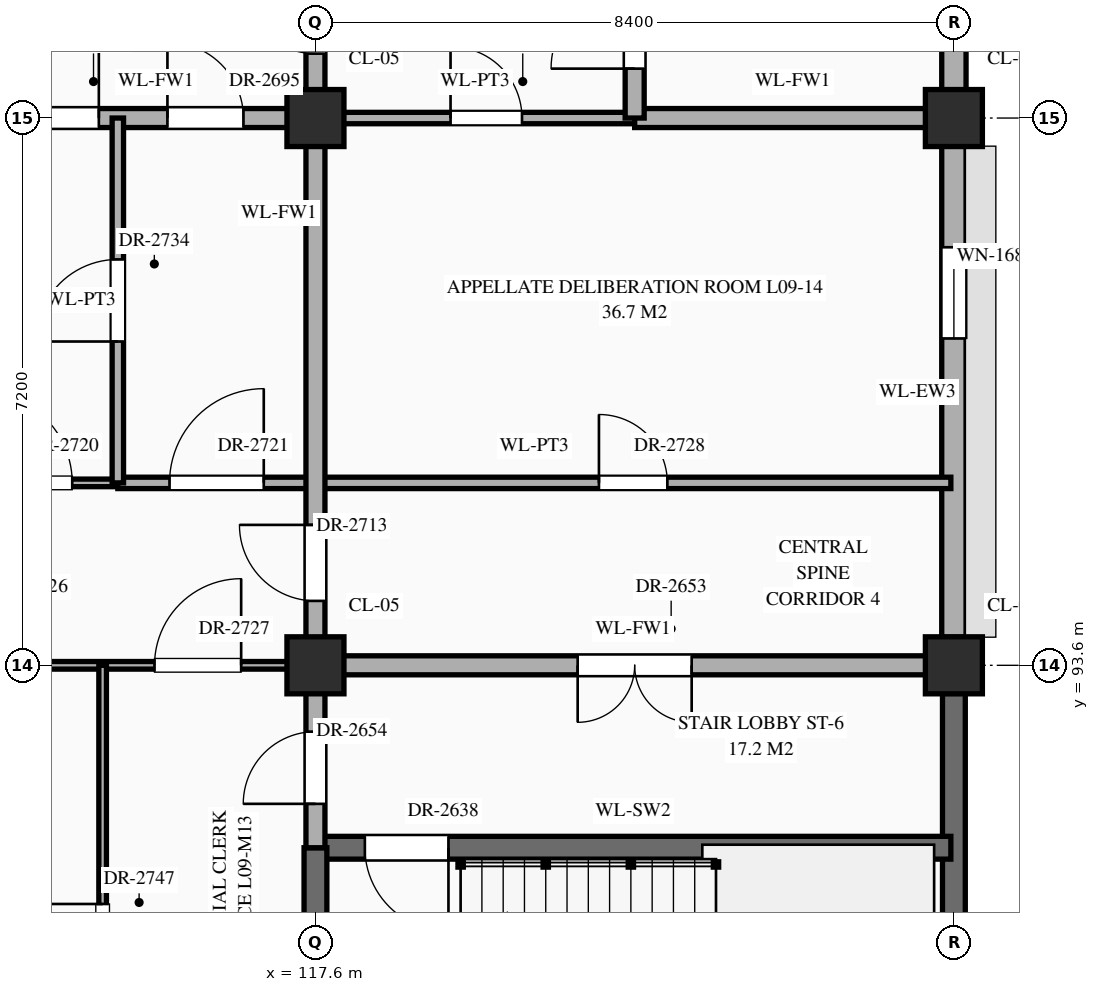
"""IFC4 building model, lengths in metres.
Left out: names, types, materials, properties, quantities, classifications, styles, units other than length and angle.
Written with IfcOpenShell. Run it as: python <this file> out.ifc"""

import sys

from ifc_helpers import new_model, si_unit, direction, frame, frame_2d, origin, origin_2d, place, context, subcontext, project, spatial, rectangle, extrude, element, fill, save


model = new_model("IFC4")
c1 = context("Model", 3, precision=1e-05, world=origin(), true_north=direction((0.0, 1.0)))
c2 = subcontext(c1, "Body", "Model", "MODEL_VIEW")
j1 = project(units=[si_unit("LENGTHUNIT", "METRE"), si_unit("PLANEANGLEUNIT", "RADIAN")], contexts=[c1])
p1 = place(None, origin())
s1 = spatial("IfcSite", under=j1, at=p1, CompositionType="ELEMENT")
p2 = place(p1, origin())
s2 = spatial("IfcBuilding", under=s1, at=p2, CompositionType="ELEMENT")
p3 = place(p2, frame((0.0, 0.0, 39.3)))
s3 = spatial("IfcBuildingStorey", under=s2, at=p3, CompositionType="ELEMENT", Elevation=39.3)
for number, where, z_axis, x_axis in (
    (1, (117.6, 93.6, 0.0), (0.0, 0.0, 1.0), (1.0, 0.0, 0.0)),
    (2, (117.6, 100.8, 0.0), (0.0, 0.0, 1.0), (1.0, 0.0, 0.0)),
    (3, (126.0, 93.6, 0.0), (0.0, 0.0, 1.0), (1.0, 0.0, 0.0)),
    (4, (126.0, 100.8, 0.0), (0.0, 0.0, 1.0), (1.0, 0.0, 0.0)),
):
    element("IfcColumn", number, at=place(p3, frame(where, z_axis=z_axis, x_axis=x_axis)), inside=s3, PredefinedType="COLUMN", context=c2, shape_type="SweptSolid", body=[
        extrude(rectangle(XDim=0.75, YDim=0.75, at=origin_2d()), origin(), (0.0, 0.0, 1.0), 4.2),
    ])
p4 = place(p3, frame((126.0, 86.77, 0.0), z_axis=(0.0, 0.0, 1.0), x_axis=(0.0, 1.0, 0.0)))
e5 = element("IfcWall", 5, at=p4, inside=s3, PredefinedType="SHEAR", context=c2, shape_type="SweptSolid", body=[
    extrude(rectangle(XDim=6.46, YDim=0.3, at=frame_2d((3.23, 0.0))), origin(), (0.0, 0.0, 1.0), 3.95),
])
p5 = place(p3, frame((126.0, 93.97, 0.0), z_axis=(0.0, 0.0, 1.0), x_axis=(0.0, 1.0, 0.0)))
e6 = element("IfcWall", 6, at=p5, inside=s3, PredefinedType="STANDARD", context=c2, shape_type="SweptSolid", body=[
    extrude(rectangle(XDim=6.46, YDim=0.32, at=frame_2d((3.23, 0.0))), origin(), (0.0, 0.0, 1.0), 3.3),
])
p6 = place(p5, frame((3.93, 0.0, 0.85)))
e7 = element("IfcOpeningElement", 7, at=p6, cuts=e6, PredefinedType="OPENING", context=c2, shape_type="SweptSolid", body=[
    extrude(rectangle(XDim=1.2, YDim=1.38, at=frame_2d((0.6, 0.69))), frame((0.0, 0.172, 0.0), z_axis=(0.0, -1.0, 0.0), x_axis=(1.0, 0.0, 0.0)), (0.0, 0.0, 1.0), 0.344),
])
p7 = place(p3, frame((126.0, 101.17, 0.0), z_axis=(0.0, 0.0, 1.0), x_axis=(0.0, 1.0, 0.0)))
e8 = element("IfcWall", 8, at=p7, inside=s3, PredefinedType="STANDARD", context=c2, shape_type="SweptSolid", body=[
    extrude(rectangle(XDim=6.46, YDim=0.32, at=frame_2d((3.23, 0.0))), origin(), (0.0, 0.0, 1.0), 3.3),
])
p8 = place(p3, frame((117.6, 91.2, 0.0), z_axis=(0.0, 0.0, 1.0), x_axis=(1.0, 0.0, 0.0)))
e9 = element("IfcWall", 9, at=p8, inside=s3, PredefinedType="SHEAR", context=c2, shape_type="SweptSolid", body=[
    extrude(rectangle(XDim=8.36, YDim=0.3, at=frame_2d((4.18, 0.0))), origin(), (0.0, 0.0, 1.0), 3.95),
])
p9 = place(p8, frame((0.65, 0.0, 0.0)))
e10 = element("IfcOpeningElement", 10, at=p9, cuts=e9, PredefinedType="OPENING", context=c2, shape_type="SweptSolid", body=[
    extrude(rectangle(XDim=1.1, YDim=2.2, at=frame_2d((0.55, 1.1))), frame((0.0, 0.162, 0.0), z_axis=(0.0, -1.0, 0.0), x_axis=(1.0, 0.0, 0.0)), (0.0, 0.0, 1.0), 0.324),
])
p10 = place(p3, frame((109.2, 93.6, 0.0), z_axis=(0.0, 0.0, 1.0), x_axis=(1.0, 0.0, 0.0)))
e11 = element("IfcWall", 11, at=p10, inside=s3, PredefinedType="STANDARD", context=c2, shape_type="SweptSolid", body=[
    extrude(rectangle(XDim=8.4, YDim=0.1, at=frame_2d((4.2, 0.0))), origin(), (0.0, 0.0, 1.0), 3.1),
])
p11 = place(p10, frame((1.038, 0.0, 0.0)))
e12 = element("IfcOpeningElement", 12, at=p11, cuts=e11, PredefinedType="OPENING", context=c2, shape_type="SweptSolid", body=[
    extrude(rectangle(XDim=1.02, YDim=2.4, at=frame_2d((0.51, 1.2))), frame((0.0, 0.062, 0.0), z_axis=(0.0, -1.0, 0.0), x_axis=(1.0, 0.0, 0.0)), (0.0, 0.0, 1.0), 0.124),
])
p12 = place(p10, frame((3.67, 0.0, 0.0)))
e13 = element("IfcOpeningElement", 13, at=p12, cuts=e11, PredefinedType="OPENING", context=c2, shape_type="SweptSolid", body=[
    extrude(rectangle(XDim=1.06, YDim=2.4, at=frame_2d((0.53, 1.2))), frame((0.0, 0.062, 0.0), z_axis=(0.0, -1.0, 0.0), x_axis=(1.0, 0.0, 0.0)), (0.0, 0.0, 1.0), 0.124),
])
p13 = place(p10, frame((6.282, 0.0, 0.0)))
e14 = element("IfcOpeningElement", 14, at=p13, cuts=e11, PredefinedType="OPENING", context=c2, shape_type="SweptSolid", body=[
    extrude(rectangle(XDim=1.14, YDim=2.4, at=frame_2d((0.57, 1.2))), frame((0.0, 0.062, 0.0), z_axis=(0.0, -1.0, 0.0), x_axis=(1.0, 0.0, 0.0)), (0.0, 0.0, 1.0), 0.124),
])
p14 = place(p3, frame((117.6, 93.6, 0.0), z_axis=(0.0, 0.0, 1.0), x_axis=(1.0, 0.0, 0.0)))
e15 = element("IfcWall", 15, at=p14, inside=s3, PredefinedType="STANDARD", context=c2, shape_type="SweptSolid", body=[
    extrude(rectangle(XDim=8.36, YDim=0.25, at=frame_2d((4.18, 0.0))), origin(), (0.0, 0.0, 1.0), 3.1),
])
p15 = place(p14, frame((3.45, 0.0, 0.0)))
e16 = element("IfcOpeningElement", 16, at=p15, cuts=e15, PredefinedType="OPENING", context=c2, shape_type="SweptSolid", body=[
    extrude(rectangle(XDim=1.5, YDim=2.25, at=frame_2d((0.75, 1.125))), frame((0.0, 0.137, 0.0), z_axis=(0.0, -1.0, 0.0), x_axis=(1.0, 0.0, 0.0)), (0.0, 0.0, 1.0), 0.274),
])
p16 = place(p3, frame((109.2, 96.0, 0.0), z_axis=(0.0, 0.0, 1.0), x_axis=(1.0, 0.0, 0.0)))
e17 = element("IfcWall", 17, at=p16, inside=s3, PredefinedType="STANDARD", context=c2, shape_type="SweptSolid", body=[
    extrude(rectangle(XDim=5.8, YDim=0.1, at=frame_2d((2.9, 0.0))), origin(), (0.0, 0.0, 1.0), 3.95),
])
p17 = place(p16, frame((1.12, 0.0, 0.0)))
e18 = element("IfcOpeningElement", 18, at=p17, cuts=e17, PredefinedType="OPENING", context=c2, shape_type="SweptSolid", body=[
    extrude(rectangle(XDim=1.16, YDim=2.3, at=frame_2d((0.58, 1.15))), frame((0.0, 0.062, 0.0), z_axis=(0.0, -1.0, 0.0), x_axis=(1.0, 0.0, 0.0)), (0.0, 0.0, 1.0), 0.124),
])
p18 = place(p16, frame((4.0, 0.0, 0.0)))
e19 = element("IfcOpeningElement", 19, at=p18, cuts=e17, PredefinedType="OPENING", context=c2, shape_type="SweptSolid", body=[
    extrude(rectangle(XDim=1.2, YDim=2.35, at=frame_2d((0.6, 1.175))), frame((0.0, 0.062, 0.0), z_axis=(0.0, -1.0, 0.0), x_axis=(1.0, 0.0, 0.0)), (0.0, 0.0, 1.0), 0.124),
])
p19 = place(p3, frame((115.0, 96.0, 0.0), z_axis=(0.0, 0.0, 1.0), x_axis=(1.0, 0.0, 0.0)))
e20 = element("IfcWall", 20, at=p19, inside=s3, PredefinedType="STANDARD", context=c2, shape_type="SweptSolid", body=[
    extrude(rectangle(XDim=10.96, YDim=0.15, at=frame_2d((5.48, 0.0))), origin(), (0.0, 0.0, 1.0), 3.95),
])
p20 = place(p19, frame((0.68, 0.0, 0.0)))
e21 = element("IfcOpeningElement", 21, at=p20, cuts=e20, PredefinedType="OPENING", context=c2, shape_type="SweptSolid", body=[
    extrude(rectangle(XDim=1.24, YDim=2.3, at=frame_2d((0.62, 1.15))), frame((0.0, 0.087, 0.0), z_axis=(0.0, -1.0, 0.0), x_axis=(1.0, 0.0, 0.0)), (0.0, 0.0, 1.0), 0.174),
])
p21 = place(p19, frame((6.33, 0.0, 0.0)))
e22 = element("IfcOpeningElement", 22, at=p21, cuts=e20, PredefinedType="OPENING", context=c2, shape_type="SweptSolid", body=[
    extrude(rectangle(XDim=0.9, YDim=2.15, at=frame_2d((0.45, 1.075))), frame((0.0, 0.087, 0.0), z_axis=(0.0, -1.0, 0.0), x_axis=(1.0, 0.0, 0.0)), (0.0, 0.0, 1.0), 0.174),
])
p22 = place(p3, frame((113.4, 100.8, 0.0), z_axis=(0.0, 0.0, 1.0), x_axis=(1.0, 0.0, 0.0)))
e23 = element("IfcWall", 23, at=p22, inside=s3, PredefinedType="STANDARD", context=c2, shape_type="SweptSolid", body=[
    extrude(rectangle(XDim=4.2, YDim=0.25, at=frame_2d((2.1, 0.0))), origin(), (0.0, 0.0, 1.0), 3.1),
])
p23 = place(p22, frame((0.25, 0.0, 0.0)))
e24 = element("IfcOpeningElement", 24, at=p23, cuts=e23, PredefinedType="OPENING", context=c2, shape_type="SweptSolid", body=[
    extrude(rectangle(XDim=1.1, YDim=2.2, at=frame_2d((0.55, 1.1))), frame((0.0, 0.137, 0.0), z_axis=(0.0, -1.0, 0.0), x_axis=(1.0, 0.0, 0.0)), (0.0, 0.0, 1.0), 0.274),
])
p24 = place(p22, frame((2.252, 0.0, 0.0)))
e25 = element("IfcOpeningElement", 25, at=p24, cuts=e23, PredefinedType="OPENING", context=c2, shape_type="SweptSolid", body=[
    extrude(rectangle(XDim=1.0, YDim=2.2, at=frame_2d((0.5, 1.1))), frame((0.0, 0.137, 0.0), z_axis=(0.0, -1.0, 0.0), x_axis=(1.0, 0.0, 0.0)), (0.0, 0.0, 1.0), 0.274),
])
p25 = place(p3, frame((117.6, 100.8, 0.0), z_axis=(0.0, 0.0, 1.0), x_axis=(1.0, 0.0, 0.0)))
e26 = element("IfcWall", 26, at=p25, inside=s3, PredefinedType="STANDARD", context=c2, shape_type="SweptSolid", body=[
    extrude(rectangle(XDim=4.2, YDim=0.15, at=frame_2d((2.1, 0.0))), origin(), (0.0, 0.0, 1.0), 3.1),
])
p26 = place(p25, frame((1.778, 0.0, 0.0)))
e27 = element("IfcOpeningElement", 27, at=p26, cuts=e26, PredefinedType="OPENING", context=c2, shape_type="SweptSolid", body=[
    extrude(rectangle(XDim=0.94, YDim=2.3, at=frame_2d((0.47, 1.15))), frame((0.0, 0.087, 0.0), z_axis=(0.0, -1.0, 0.0), x_axis=(1.0, 0.0, 0.0)), (0.0, 0.0, 1.0), 0.174),
])
p27 = place(p3, frame((121.8, 100.8, 0.0), z_axis=(0.0, 0.0, 1.0), x_axis=(1.0, 0.0, 0.0)))
e28 = element("IfcWall", 28, at=p27, inside=s3, PredefinedType="STANDARD", context=c2, shape_type="SweptSolid", body=[
    extrude(rectangle(XDim=4.16, YDim=0.25, at=frame_2d((2.08, 0.0))), origin(), (0.0, 0.0, 1.0), 3.1),
])
p28 = place(p3, frame((114.8, 86.4, 0.0), z_axis=(0.0, 0.0, 1.0), x_axis=(0.0, 1.0, 0.0)))
e29 = element("IfcWall", 29, at=p28, inside=s3, PredefinedType="STANDARD", context=c2, shape_type="SweptSolid", body=[
    extrude(rectangle(XDim=7.2, YDim=0.1, at=frame_2d((3.6, 0.0))), origin(), (0.0, 0.0, 1.0), 3.95),
])
p29 = place(p28, frame((3.14, 0.0, 0.0)))
e30 = element("IfcOpeningElement", 30, at=p29, cuts=e29, PredefinedType="OPENING", context=c2, shape_type="SweptSolid", body=[
    extrude(rectangle(XDim=0.92, YDim=2.15, at=frame_2d((0.46, 1.075))), frame((0.0, 0.062, 0.0), z_axis=(0.0, -1.0, 0.0), x_axis=(1.0, 0.0, 0.0)), (0.0, 0.0, 1.0), 0.124),
])
p30 = place(p3, frame((115.0, 96.0, 0.0), z_axis=(0.0, 0.0, 1.0), x_axis=(0.0, 1.0, 0.0)))
e31 = element("IfcWall", 31, at=p30, inside=s3, PredefinedType="STANDARD", context=c2, shape_type="SweptSolid", body=[
    extrude(rectangle(XDim=4.8, YDim=0.15, at=frame_2d((2.4, 0.0))), origin(), (0.0, 0.0, 1.0), 3.95),
])
p31 = place(p30, frame((1.86, 0.0, 0.0)))
e32 = element("IfcOpeningElement", 32, at=p31, cuts=e31, PredefinedType="OPENING", context=c2, shape_type="SweptSolid", body=[
    extrude(rectangle(XDim=1.08, YDim=2.25, at=frame_2d((0.54, 1.125))), frame((0.0, 0.087, 0.0), z_axis=(0.0, -1.0, 0.0), x_axis=(1.0, 0.0, 0.0)), (0.0, 0.0, 1.0), 0.174),
])
p32 = place(p3, frame((117.6, 86.4, 0.0), z_axis=(0.0, 0.0, 1.0), x_axis=(0.0, 1.0, 0.0)))
e33 = element("IfcWall", 33, at=p32, inside=s3, PredefinedType="SHEAR", context=c2, shape_type="SweptSolid", body=[
    extrude(rectangle(XDim=4.8, YDim=0.3, at=frame_2d((2.4, 0.0))), origin(), (0.0, 0.0, 1.0), 3.95),
])
p33 = place(p3, frame((117.6, 91.2, 0.0), z_axis=(0.0, 0.0, 1.0), x_axis=(0.0, 1.0, 0.0)))
e34 = element("IfcWall", 34, at=p33, inside=s3, PredefinedType="STANDARD", context=c2, shape_type="SweptSolid", body=[
    extrude(rectangle(XDim=13.2, YDim=0.25, at=frame_2d((6.6, 0.0))), origin(), (0.0, 0.0, 1.0), 3.2),
])
p34 = place(p33, frame((0.577, 0.0, 0.0)))
e35 = element("IfcOpeningElement", 35, at=p34, cuts=e34, PredefinedType="OPENING", context=c2, shape_type="SweptSolid", body=[
    extrude(rectangle(XDim=0.95, YDim=2.15, at=frame_2d((0.475, 1.075))), frame((0.0, 0.137, 0.0), z_axis=(0.0, -1.0, 0.0), x_axis=(1.0, 0.0, 0.0)), (0.0, 0.0, 1.0), 0.274),
])
p35 = place(p33, frame((10.448, 0.0, 0.0)))
e36 = element("IfcOpeningElement", 36, at=p35, cuts=e34, PredefinedType="OPENING", context=c2, shape_type="SweptSolid", body=[
    extrude(rectangle(XDim=1.0, YDim=2.2, at=frame_2d((0.5, 1.1))), frame((0.0, 0.137, 0.0), z_axis=(0.0, -1.0, 0.0), x_axis=(1.0, 0.0, 0.0)), (0.0, 0.0, 1.0), 0.274),
])
p36 = place(p33, frame((3.248, 0.0, 0.0)))
e37 = element("IfcOpeningElement", 37, at=p36, cuts=e34, PredefinedType="OPENING", context=c2, shape_type="SweptSolid", body=[
    extrude(rectangle(XDim=1.0, YDim=2.2, at=frame_2d((0.5, 1.1))), frame((0.0, 0.137, 0.0), z_axis=(0.0, -1.0, 0.0), x_axis=(1.0, 0.0, 0.0)), (0.0, 0.0, 1.0), 0.274),
])
p37 = place(p3, frame((121.8, 100.8, 0.0), z_axis=(0.0, 0.0, 1.0), x_axis=(0.0, 1.0, 0.0)))
e38 = element("IfcWall", 38, at=p37, inside=s3, PredefinedType="STANDARD", context=c2, shape_type="SweptSolid", body=[
    extrude(rectangle(XDim=3.6, YDim=0.25, at=frame_2d((1.8, 0.0))), origin(), (0.0, 0.0, 1.0), 3.6),
])
p38 = place(p37, frame((0.65, 0.0, 0.0)))
e39 = element("IfcOpeningElement", 39, at=p38, cuts=e38, PredefinedType="OPENING", context=c2, shape_type="SweptSolid", body=[
    extrude(rectangle(XDim=1.1, YDim=2.2, at=frame_2d((0.55, 1.1))), frame((0.0, 0.137, 0.0), z_axis=(0.0, -1.0, 0.0), x_axis=(1.0, 0.0, 0.0)), (0.0, 0.0, 1.0), 0.274),
])
p39 = place(p6, origin())
e40 = element("IfcWindow", 40, at=p39, inside=s3, PartitioningType="SINGLE_PANEL", PredefinedType="WINDOW", context=c2, shape_type="SweptSolid", body=[
    extrude(rectangle(XDim=1.2, YDim=1.38, at=frame_2d((0.6, 0.69))), frame((0.0, 0.03, 0.0), z_axis=(0.0, -1.0, 0.0), x_axis=(1.0, 0.0, 0.0)), (0.0, 0.0, 1.0), 0.06),
])
fill(e7, e40)
p40 = place(p9, frame((1.1, 0.0, 0.0), z_axis=(0.0, 0.0, 1.0), x_axis=(-1.0, 0.0, 0.0)))
e41 = element("IfcDoor", 41, at=p40, inside=s3, OperationType="SINGLE_SWING_LEFT", PredefinedType="DOOR", context=c2, shape_type="SweptSolid", body=[
    extrude(rectangle(XDim=1.1, YDim=2.2, at=frame_2d((0.55, 1.1))), frame((0.0, 0.025, 0.0), z_axis=(0.0, -1.0, 0.0), x_axis=(1.0, 0.0, 0.0)), (0.0, 0.0, 1.0), 0.05),
])
fill(e10, e41)
p41 = place(p15, frame((1.5, 0.0, 0.0), z_axis=(0.0, 0.0, 1.0), x_axis=(-1.0, 0.0, 0.0)))
e42 = element("IfcDoor", 42, at=p41, inside=s3, OperationType="DOUBLE_DOOR_SINGLE_SWING", PredefinedType="DOOR", context=c2, shape_type="SweptSolid", body=[
    extrude(rectangle(XDim=1.5, YDim=2.25, at=frame_2d((0.75, 1.125))), frame((0.0, 0.025, 0.0), z_axis=(0.0, -1.0, 0.0), x_axis=(1.0, 0.0, 0.0)), (0.0, 0.0, 1.0), 0.05),
])
fill(e16, e42)
p42 = place(p34, origin())
e43 = element("IfcDoor", 43, at=p42, inside=s3, OperationType="SINGLE_SWING_LEFT", PredefinedType="DOOR", context=c2, shape_type="SweptSolid", body=[
    extrude(rectangle(XDim=0.95, YDim=2.15, at=frame_2d((0.475, 1.075))), frame((0.0, 0.025, 0.0), z_axis=(0.0, -1.0, 0.0), x_axis=(1.0, 0.0, 0.0)), (0.0, 0.0, 1.0), 0.05),
])
fill(e35, e43)
p43 = place(p38, origin())
e44 = element("IfcDoor", 44, at=p43, inside=s3, OperationType="SINGLE_SWING_LEFT", PredefinedType="DOOR", context=c2, shape_type="SweptSolid", body=[
    extrude(rectangle(XDim=1.1, YDim=2.2, at=frame_2d((0.55, 1.1))), frame((0.0, 0.025, 0.0), z_axis=(0.0, -1.0, 0.0), x_axis=(1.0, 0.0, 0.0)), (0.0, 0.0, 1.0), 0.05),
])
fill(e39, e44)
p44 = place(p35, origin())
e45 = element("IfcDoor", 45, at=p44, inside=s3, OperationType="SINGLE_SWING_RIGHT", PredefinedType="DOOR", context=c2, shape_type="SweptSolid", body=[
    extrude(rectangle(XDim=1.0, YDim=2.2, at=frame_2d((0.5, 1.1))), frame((0.0, 0.025, 0.0), z_axis=(0.0, -1.0, 0.0), x_axis=(1.0, 0.0, 0.0)), (0.0, 0.0, 1.0), 0.05),
])
fill(e36, e45)
p45 = place(p26, origin())
e46 = element("IfcDoor", 46, at=p45, inside=s3, OperationType="SINGLE_SWING_LEFT", PredefinedType="DOOR", context=c2, shape_type="SweptSolid", body=[
    extrude(rectangle(XDim=0.94, YDim=2.3, at=frame_2d((0.47, 1.15))), frame((0.0, 0.025, 0.0), z_axis=(0.0, -1.0, 0.0), x_axis=(1.0, 0.0, 0.0)), (0.0, 0.0, 1.0), 0.05),
])
fill(e27, e46)
p46 = place(p23, origin())
e47 = element("IfcDoor", 47, at=p46, inside=s3, OperationType="SINGLE_SWING_RIGHT", PredefinedType="DOOR", context=c2, shape_type="SweptSolid", body=[
    extrude(rectangle(XDim=1.1, YDim=2.2, at=frame_2d((0.55, 1.1))), frame((0.0, 0.025, 0.0), z_axis=(0.0, -1.0, 0.0), x_axis=(1.0, 0.0, 0.0)), (0.0, 0.0, 1.0), 0.05),
])
fill(e24, e47)
p47 = place(p24, origin())
e48 = element("IfcDoor", 48, at=p47, inside=s3, OperationType="SINGLE_SWING_LEFT", PredefinedType="DOOR", context=c2, shape_type="SweptSolid", body=[
    extrude(rectangle(XDim=1.0, YDim=2.2, at=frame_2d((0.5, 1.1))), frame((0.0, 0.025, 0.0), z_axis=(0.0, -1.0, 0.0), x_axis=(1.0, 0.0, 0.0)), (0.0, 0.0, 1.0), 0.05),
])
fill(e25, e48)
p48 = place(p36, origin())
e49 = element("IfcDoor", 49, at=p48, inside=s3, OperationType="SINGLE_SWING_RIGHT", PredefinedType="DOOR", context=c2, shape_type="SweptSolid", body=[
    extrude(rectangle(XDim=1.0, YDim=2.2, at=frame_2d((0.5, 1.1))), frame((0.0, 0.025, 0.0), z_axis=(0.0, -1.0, 0.0), x_axis=(1.0, 0.0, 0.0)), (0.0, 0.0, 1.0), 0.05),
])
fill(e37, e49)
p49 = place(p18, origin())
e50 = element("IfcDoor", 50, at=p49, inside=s3, OperationType="SINGLE_SWING_LEFT", PredefinedType="DOOR", context=c2, shape_type="SweptSolid", body=[
    extrude(rectangle(XDim=1.2, YDim=2.35, at=frame_2d((0.6, 1.175))), frame((0.0, 0.025, 0.0), z_axis=(0.0, -1.0, 0.0), x_axis=(1.0, 0.0, 0.0)), (0.0, 0.0, 1.0), 0.05),
])
fill(e19, e50)
p50 = place(p20, origin())
e51 = element("IfcDoor", 51, at=p50, inside=s3, OperationType="SINGLE_SWING_RIGHT", PredefinedType="DOOR", context=c2, shape_type="SweptSolid", body=[
    extrude(rectangle(XDim=1.24, YDim=2.3, at=frame_2d((0.62, 1.15))), frame((0.0, 0.025, 0.0), z_axis=(0.0, -1.0, 0.0), x_axis=(1.0, 0.0, 0.0)), (0.0, 0.0, 1.0), 0.05),
])
fill(e21, e51)
p51 = place(p13, origin())
e52 = element("IfcDoor", 52, at=p51, inside=s3, OperationType="SINGLE_SWING_RIGHT", PredefinedType="DOOR", context=c2, shape_type="SweptSolid", body=[
    extrude(rectangle(XDim=1.14, YDim=2.4, at=frame_2d((0.57, 1.2))), frame((0.0, 0.025, 0.0), z_axis=(0.0, -1.0, 0.0), x_axis=(1.0, 0.0, 0.0)), (0.0, 0.0, 1.0), 0.05),
])
fill(e14, e52)
p52 = place(p21, origin())
e53 = element("IfcDoor", 53, at=p52, inside=s3, OperationType="SINGLE_SWING_LEFT", PredefinedType="DOOR", context=c2, shape_type="SweptSolid", body=[
    extrude(rectangle(XDim=0.9, YDim=2.15, at=frame_2d((0.45, 1.075))), frame((0.0, 0.025, 0.0), z_axis=(0.0, -1.0, 0.0), x_axis=(1.0, 0.0, 0.0)), (0.0, 0.0, 1.0), 0.05),
])
fill(e22, e53)
p53 = place(p31, origin())
e54 = element("IfcDoor", 54, at=p53, inside=s3, OperationType="SINGLE_SWING_LEFT", PredefinedType="DOOR", context=c2, shape_type="SweptSolid", body=[
    extrude(rectangle(XDim=1.08, YDim=2.25, at=frame_2d((0.54, 1.125))), frame((0.0, 0.025, 0.0), z_axis=(0.0, -1.0, 0.0), x_axis=(1.0, 0.0, 0.0)), (0.0, 0.0, 1.0), 0.05),
])
fill(e32, e54)
p54 = place(p29, origin())
e55 = element("IfcDoor", 55, at=p54, inside=s3, OperationType="SINGLE_SWING_RIGHT", PredefinedType="DOOR", context=c2, shape_type="SweptSolid", body=[
    extrude(rectangle(XDim=0.92, YDim=2.15, at=frame_2d((0.46, 1.075))), frame((0.0, 0.025, 0.0), z_axis=(0.0, -1.0, 0.0), x_axis=(1.0, 0.0, 0.0)), (0.0, 0.0, 1.0), 0.05),
])
fill(e30, e55)
save(model, sys.argv[1])
